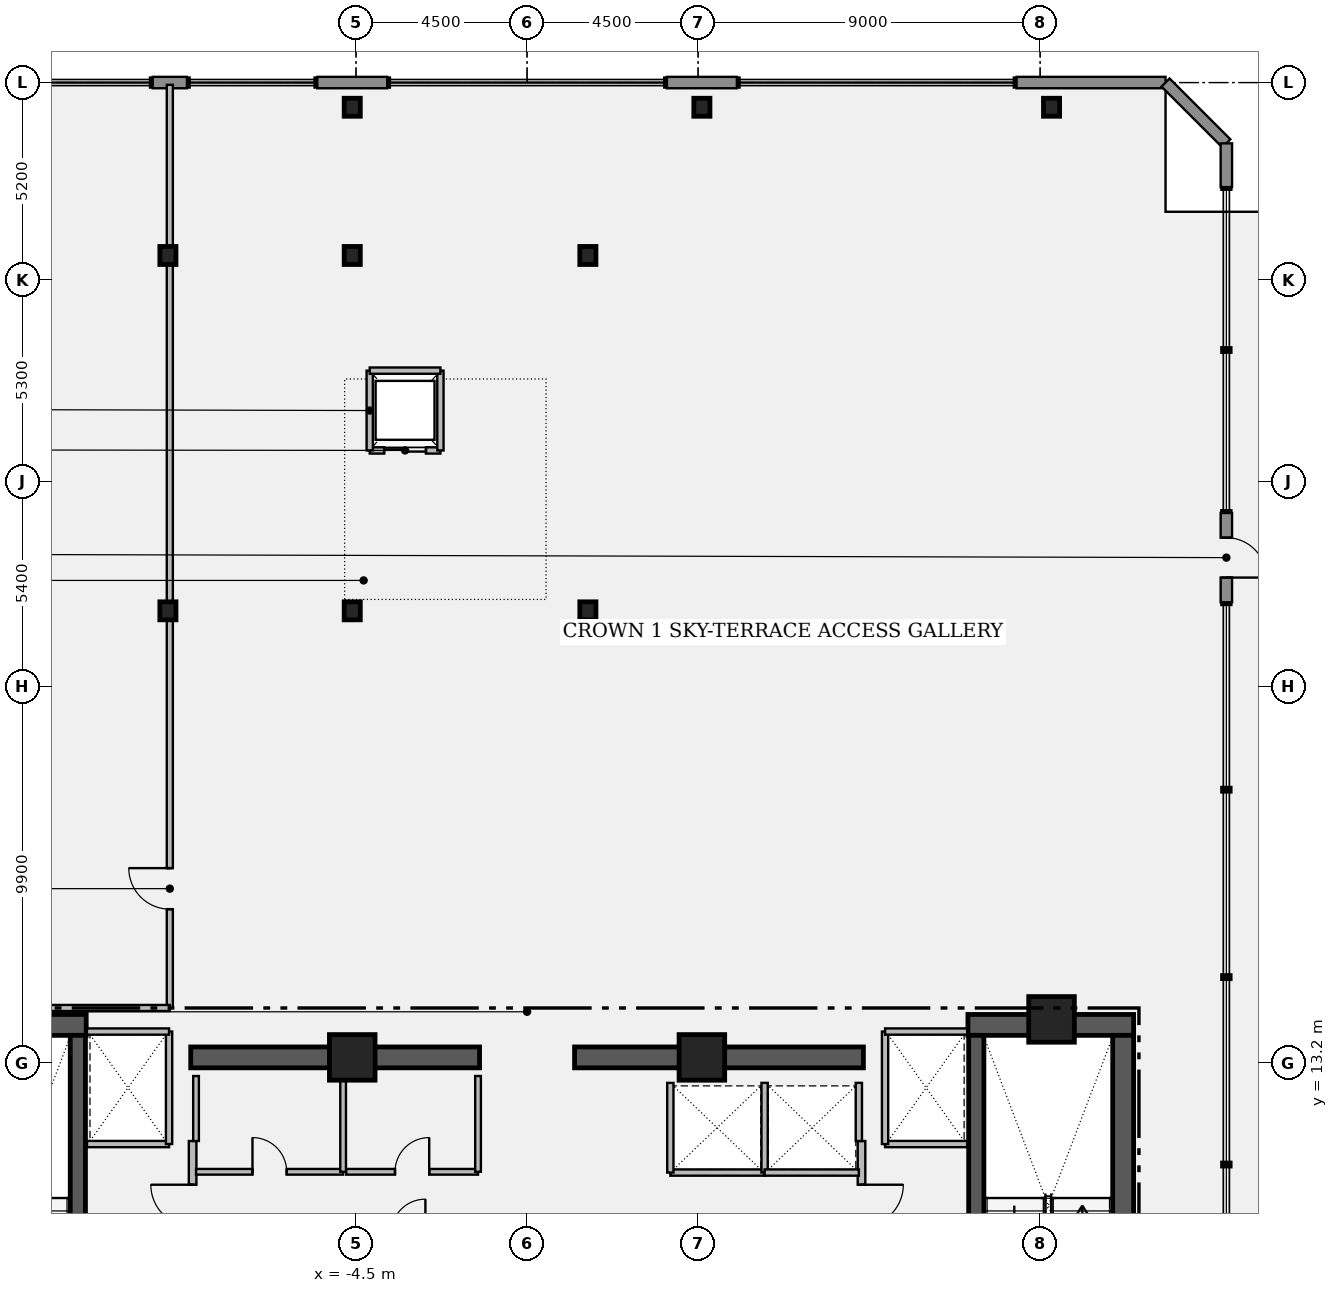
"""IFC4 building model, lengths in metres.
Left out: names, types, materials, properties, quantities, classifications, styles, units other than length and angle.
Written with IfcOpenShell. Run it as: python <this file> out.ifc"""

import sys

from ifc_helpers import new_model, si_unit, direction, frame, frame_2d, origin, origin_2d, place, context, subcontext, project, spatial, rectangle, i_section, extrude, element, fill, save


model = new_model("IFC4")
c1 = context("Model", 3, precision=1e-05, world=origin(), true_north=direction((0.0, 1.0)))
c2 = subcontext(c1, "Body", "Model", "MODEL_VIEW")
j1 = project(units=[si_unit("LENGTHUNIT", "METRE"), si_unit("PLANEANGLEUNIT", "RADIAN")], contexts=[c1])
p1 = place(None, origin())
s1 = spatial("IfcSite", under=j1, at=p1, CompositionType="ELEMENT")
p2 = place(p1, origin())
s2 = spatial("IfcBuilding", under=s1, at=p2, CompositionType="ELEMENT")
p3 = place(p2, frame((0.0, 0.0, 297.25)))
s3 = spatial("IfcBuildingStorey", under=s2, at=p3, CompositionType="ELEMENT", Elevation=297.25)
for number, where, z_axis, x_axis in (
    (1, (-15.96, 14.205, 0.0), (0.0, 0.0, 1.0), (1.0, 0.0, 0.0)),
    (2, (11.6, 14.205, 0.0), (0.0, 0.0, 1.0), (1.0, 0.0, 0.0)),
):
    element("IfcWall", number, at=place(p3, frame(where, z_axis=z_axis, x_axis=x_axis)), inside=s3, PredefinedType="SHEAR", context=c2, shape_type="SweptSolid", body=[
        extrude(rectangle(XDim=4.36, YDim=0.55, at=frame_2d((2.18, 0.0))), origin(), (0.0, 0.0, 1.0), 3.61),
    ])
p4 = place(p3, frame((15.685, 4.97, 0.0), z_axis=(0.0, 0.0, 1.0), x_axis=(0.0, 1.0, 0.0)))
e3 = element("IfcWall", 3, at=p4, inside=s3, PredefinedType="SHEAR", context=c2, shape_type="SweptSolid", body=[
    extrude(rectangle(XDim=8.96, YDim=0.55, at=frame_2d((4.48, 0.0))), origin(), (0.0, 0.0, 1.0), 3.61),
])
for number, where, z_axis, x_axis in (
    (4, (-8.85, 13.35, 0.0), (0.0, 0.0, 1.0), (1.0, 0.0, 0.0)),
    (5, (1.25, 13.35, 0.0), (0.0, 0.0, 1.0), (1.0, 0.0, 0.0)),
):
    element("IfcWall", number, at=place(p3, frame(where, z_axis=z_axis, x_axis=x_axis)), inside=s3, PredefinedType="SHEAR", context=c2, shape_type="SweptSolid", body=[
        extrude(rectangle(XDim=7.6, YDim=0.55, at=frame_2d((3.8, 0.0))), origin(), (0.0, 0.0, 1.0), 3.56),
    ])
p5 = place(p3, frame((-11.82, 4.97, 0.0), z_axis=(0.0, 0.0, 1.0), x_axis=(0.0, 1.0, 0.0)))
e6 = element("IfcWall", 6, at=p5, inside=s3, PredefinedType="SHEAR", context=c2, shape_type="SweptSolid", body=[
    extrude(rectangle(XDim=8.96, YDim=0.4, at=frame_2d((4.48, 0.0))), origin(), (0.0, 0.0, 1.0), 3.61),
])
p6 = place(p5, frame((0.31, 0.0, 0.0)))
e7 = element("IfcOpeningElement", 7, at=p6, cuts=e6, PredefinedType="OPENING", context=c2, shape_type="SweptSolid", body=[
    extrude(rectangle(XDim=1.12, YDim=2.22, at=frame_2d((0.56, 1.11))), frame((0.0, 0.21, 0.0), z_axis=(0.0, -1.0, 0.0), x_axis=(1.0, 0.0, 0.0)), (0.0, 0.0, 1.0), 0.42),
])
p7 = place(p3, frame((11.82, 13.93, 0.0), z_axis=(0.0, 0.0, 1.0), x_axis=(0.0, -1.0, 0.0)))
e8 = element("IfcWall", 8, at=p7, inside=s3, PredefinedType="SHEAR", context=c2, shape_type="SweptSolid", body=[
    extrude(rectangle(XDim=8.96, YDim=0.4, at=frame_2d((4.48, 0.0))), origin(), (0.0, 0.0, 1.0), 3.61),
])
p8 = place(p7, frame((7.53, 0.0, 0.0)))
e9 = element("IfcOpeningElement", 9, at=p8, cuts=e8, PredefinedType="OPENING", context=c2, shape_type="SweptSolid", body=[
    extrude(rectangle(XDim=1.12, YDim=2.22, at=frame_2d((0.56, 1.11))), frame((0.0, 0.21, 0.0), z_axis=(0.0, -1.0, 0.0), x_axis=(1.0, 0.0, 0.0)), (0.0, 0.0, 1.0), 0.42),
])
for number, where, z_axis, x_axis in (
    (10, (-4.6, 13.35, 0.0), (0.0, 0.0, 1.0), (1.0, 0.0, 0.0)),
    (11, (4.6, 13.35, 0.0), (0.0, 0.0, 1.0), (1.0, 0.0, 0.0)),
    (12, (13.8, 14.35, 0.0), (0.0, 0.0, 1.0), (1.0, 0.0, 0.0)),
):
    element("IfcColumn", number, at=place(p3, frame(where, z_axis=z_axis, x_axis=x_axis)), inside=s3, PredefinedType="COLUMN", context=c2, shape_type="SweptSolid", body=[
        extrude(rectangle(XDim=1.2, YDim=1.2, at=origin_2d()), origin(), (0.0, 0.0, 1.0), 3.8),
    ])
for number, where, z_axis, x_axis in (
    (13, (-9.45, 25.1, -0.24), (0.0, 0.0, 1.0), (1.0, 0.0, 0.0)),
    (14, (-4.6, 25.1, -0.24), (0.0, 0.0, 1.0), (1.0, 0.0, 0.0)),
    (15, (1.6, 25.1, -0.24), (0.0, 0.0, 1.0), (1.0, 0.0, 0.0)),
):
    element("IfcColumn", number, at=place(p3, frame(where, z_axis=z_axis, x_axis=x_axis)), inside=s3, PredefinedType="COLUMN", context=c2, shape_type="SweptSolid", body=[
        extrude(i_section(OverallWidth=0.424, OverallDepth=0.474, WebThickness=0.048, FlangeThickness=0.077, at=origin_2d()), origin(), (0.0, 0.0, 1.0), 4.04),
    ])
for number, where, z_axis, x_axis in (
    (16, (-9.45, 34.45, 0.0), (0.0, 0.0, 1.0), (1.0, 0.0, 0.0)),
    (17, (-4.6, 34.45, 0.0), (0.0, 0.0, 1.0), (1.0, 0.0, 0.0)),
    (18, (1.6, 34.45, 0.0), (0.0, 0.0, 1.0), (1.0, 0.0, 0.0)),
    (19, (-4.6, 38.35, 0.0), (0.0, 0.0, 1.0), (1.0, 0.0, 0.0)),
    (20, (4.6, 38.35, 0.0), (0.0, 0.0, 1.0), (1.0, 0.0, 0.0)),
    (21, (13.8, 38.35, 0.0), (0.0, 0.0, 1.0), (1.0, 0.0, 0.0)),
):
    element("IfcColumn", number, at=place(p3, frame(where, z_axis=z_axis, x_axis=x_axis)), inside=s3, PredefinedType="COLUMN", context=c2, shape_type="SweptSolid", body=[
        extrude(i_section(OverallWidth=0.424, OverallDepth=0.474, WebThickness=0.048, FlangeThickness=0.077, at=origin_2d()), origin(), (0.0, 0.0, 1.0), 3.8),
    ])
p9 = place(p3, frame((-9.85, 39.0, 0.0), z_axis=(0.0, 0.0, 1.0), x_axis=(1.0, 0.0, 0.0)))
e22 = element("IfcWall", 22, at=p9, inside=s3, PredefinedType="STANDARD", context=c2, shape_type="SweptSolid", body=[
    extrude(rectangle(XDim=0.9, YDim=0.3, at=frame_2d((0.45, 0.0))), origin(), (0.0, 0.0, 1.0), 3.56),
])
for number, where, z_axis, x_axis in (
    (23, (-5.52, 39.0, 0.0), (0.0, 0.0, 1.0), (1.0, 0.0, 0.0)),
    (24, (3.68, 39.0, 0.0), (0.0, 0.0, 1.0), (1.0, 0.0, 0.0)),
):
    element("IfcWall", number, at=place(p3, frame(where, z_axis=z_axis, x_axis=x_axis)), inside=s3, PredefinedType="STANDARD", context=c2, shape_type="SweptSolid", body=[
        extrude(rectangle(XDim=1.84, YDim=0.3, at=frame_2d((0.92, 0.0))), origin(), (0.0, 0.0, 1.0), 3.56),
    ])
p10 = place(p3, frame((12.88, 39.0, 0.0), z_axis=(0.0, 0.0, 1.0), x_axis=(1.0, 0.0, 0.0)))
e25 = element("IfcWall", 25, at=p10, inside=s3, PredefinedType="STANDARD", context=c2, shape_type="SweptSolid", body=[
    extrude(rectangle(XDim=3.92, YDim=0.3, at=frame_2d((1.96, 0.0))), origin(), (0.0, 0.0, 1.0), 3.56),
])
p11 = place(p3, frame((16.8, 39.0, 0.0), z_axis=(0.0, 0.0, 1.0), x_axis=(0.707052830339, -0.707160727918, 0.0)))
e26 = element("IfcWall", 26, at=p11, inside=s3, PredefinedType="STANDARD", context=c2, shape_type="SweptSolid", body=[
    extrude(rectangle(XDim=2.263, YDim=0.3, at=frame_2d((1.131, 0.0))), origin(), (0.0, 0.0, 1.0), 3.56),
])
p12 = place(p3, frame((18.4, 37.4, 0.0), z_axis=(0.0, 0.0, 1.0), x_axis=(0.0, -1.0, 0.0)))
e27 = element("IfcWall", 27, at=p12, inside=s3, PredefinedType="STANDARD", context=c2, shape_type="SweptSolid", body=[
    extrude(rectangle(XDim=1.15, YDim=0.3, at=frame_2d((0.575, 0.0))), origin(), (0.0, 0.0, 1.0), 3.56),
])
p13 = place(p3, frame((18.4, 27.675, 0.0), z_axis=(0.0, 0.0, 1.0), x_axis=(0.0, -1.0, 0.0)))
e28 = element("IfcWall", 28, at=p13, inside=s3, PredefinedType="STANDARD", context=c2, shape_type="SweptSolid", body=[
    extrude(rectangle(XDim=2.35, YDim=0.3, at=frame_2d((1.175, 0.0))), origin(), (0.0, 0.0, 1.0), 3.56),
])
p14 = place(p13, frame((0.65, 0.0, 0.0)))
e29 = element("IfcOpeningElement", 29, at=p14, cuts=e28, PredefinedType="OPENING", context=c2, shape_type="SweptSolid", body=[
    extrude(rectangle(XDim=1.05, YDim=2.2, at=frame_2d((0.525, 1.1))), frame((0.0, 0.16, 0.0), z_axis=(0.0, -1.0, 0.0), x_axis=(1.0, 0.0, 0.0)), (0.0, 0.0, 1.0), 0.32),
])
p15 = place(p3, frame((-4.14, 29.32, 0.0), z_axis=(0.0, 0.0, 1.0), x_axis=(1.0, 0.0, 0.0)))
e30 = element("IfcWall", 30, at=p15, inside=s3, PredefinedType="PARTITIONING", context=c2, shape_type="SweptSolid", body=[
    extrude(rectangle(XDim=1.86, YDim=0.165, at=frame_2d((0.93, 0.0))), origin(), (0.0, 0.0, 1.0), 3.56),
])
p16 = place(p15, frame((0.38, 0.0, 0.0)))
e31 = element("IfcOpeningElement", 31, at=p16, cuts=e30, PredefinedType="OPENING", context=c2, shape_type="SweptSolid", body=[
    extrude(rectangle(XDim=1.1, YDim=2.25, at=frame_2d((0.55, 1.125))), frame((0.0, 0.093, 0.0), z_axis=(0.0, -1.0, 0.0), x_axis=(1.0, 0.0, 0.0)), (0.0, 0.0, 1.0), 0.185),
])
p17 = place(p3, frame((-8.8, 5.05, 0.0), z_axis=(0.0, 0.0, 1.0), x_axis=(0.0, 1.0, 0.0)))
e32 = element("IfcWall", 32, at=p17, inside=s3, PredefinedType="PARTITIONING", context=c2, shape_type="SweptSolid", body=[
    extrude(rectangle(XDim=6.1, YDim=0.2, at=frame_2d((3.05, 0.0))), origin(), (0.0, 0.0, 1.0), 3.56),
])
p18 = place(p17, frame((0.25, 0.0, 0.0)))
e33 = element("IfcOpeningElement", 33, at=p18, cuts=e32, PredefinedType="OPENING", context=c2, shape_type="SweptSolid", body=[
    extrude(rectangle(XDim=1.1, YDim=2.2, at=frame_2d((0.55, 1.1))), frame((0.0, 0.11, 0.0), z_axis=(0.0, -1.0, 0.0), x_axis=(1.0, 0.0, 0.0)), (0.0, 0.0, 1.0), 0.22),
])
p19 = place(p17, frame((3.85, 0.0, 0.0)))
e34 = element("IfcOpeningElement", 34, at=p19, cuts=e32, PredefinedType="OPENING", context=c2, shape_type="SweptSolid", body=[
    extrude(rectangle(XDim=1.1, YDim=2.2, at=frame_2d((0.55, 1.1))), frame((0.0, 0.11, 0.0), z_axis=(0.0, -1.0, 0.0), x_axis=(1.0, 0.0, 0.0)), (0.0, 0.0, 1.0), 0.22),
])
p20 = place(p3, frame((8.8, 11.15, 0.0), z_axis=(0.0, 0.0, 1.0), x_axis=(0.0, -1.0, 0.0)))
e35 = element("IfcWall", 35, at=p20, inside=s3, PredefinedType="PARTITIONING", context=c2, shape_type="SweptSolid", body=[
    extrude(rectangle(XDim=6.1, YDim=0.2, at=frame_2d((3.05, 0.0))), origin(), (0.0, 0.0, 1.0), 3.56),
])
p21 = place(p20, frame((1.15, 0.0, 0.0)))
e36 = element("IfcOpeningElement", 36, at=p21, cuts=e35, PredefinedType="OPENING", context=c2, shape_type="SweptSolid", body=[
    extrude(rectangle(XDim=1.1, YDim=2.2, at=frame_2d((0.55, 1.1))), frame((0.0, 0.11, 0.0), z_axis=(0.0, -1.0, 0.0), x_axis=(1.0, 0.0, 0.0)), (0.0, 0.0, 1.0), 0.22),
])
p22 = place(p20, frame((4.75, 0.0, 0.0)))
e37 = element("IfcOpeningElement", 37, at=p22, cuts=e35, PredefinedType="OPENING", context=c2, shape_type="SweptSolid", body=[
    extrude(rectangle(XDim=1.1, YDim=2.2, at=frame_2d((0.55, 1.1))), frame((0.0, 0.11, 0.0), z_axis=(0.0, -1.0, 0.0), x_axis=(1.0, 0.0, 0.0)), (0.0, 0.0, 1.0), 0.22),
])
p23 = place(p3, frame((-8.71, 10.34, 0.0), z_axis=(0.0, 0.0, 1.0), x_axis=(1.0, 0.0, 0.0)))
e38 = element("IfcWall", 38, at=p23, inside=s3, PredefinedType="PARTITIONING", context=c2, shape_type="SweptSolid", body=[
    extrude(rectangle(XDim=3.87, YDim=0.15, at=frame_2d((1.935, 0.0))), origin(), (0.0, 0.0, 1.0), 3.56),
])
p24 = place(p23, frame((1.485, 0.0, 0.0)))
e39 = element("IfcOpeningElement", 39, at=p24, cuts=e38, PredefinedType="OPENING", context=c2, shape_type="SweptSolid", body=[
    extrude(rectangle(XDim=0.9, YDim=2.15, at=frame_2d((0.45, 1.075))), frame((0.0, 0.085, 0.0), z_axis=(0.0, -1.0, 0.0), x_axis=(1.0, 0.0, 0.0)), (0.0, 0.0, 1.0), 0.17),
])
p25 = place(p3, frame((-4.76, 10.34, 0.0), z_axis=(0.0, 0.0, 1.0), x_axis=(1.0, 0.0, 0.0)))
e40 = element("IfcWall", 40, at=p25, inside=s3, PredefinedType="PARTITIONING", context=c2, shape_type="SweptSolid", body=[
    extrude(rectangle(XDim=3.47, YDim=0.15, at=frame_2d((1.735, 0.0))), origin(), (0.0, 0.0, 1.0), 3.56),
])
p26 = place(p25, frame((1.285, 0.0, 0.0)))
e41 = element("IfcOpeningElement", 41, at=p26, cuts=e40, PredefinedType="OPENING", context=c2, shape_type="SweptSolid", body=[
    extrude(rectangle(XDim=0.9, YDim=2.15, at=frame_2d((0.45, 1.075))), frame((0.0, 0.085, 0.0), z_axis=(0.0, -1.0, 0.0), x_axis=(1.0, 0.0, 0.0)), (0.0, 0.0, 1.0), 0.17),
])
p27 = place(p3, frame((-9.4, 14.65, 0.0), z_axis=(0.0, 0.0, 1.0), x_axis=(0.0, 1.0, 0.0)))
e42 = element("IfcWall", 42, at=p27, inside=s3, PredefinedType="PARTITIONING", context=c2, shape_type="SweptSolid", body=[
    extrude(rectangle(XDim=24.29, YDim=0.16, at=frame_2d((12.145, 0.0))), origin(), (0.0, 0.0, 1.0), 2.442),
])
p28 = place(p27, frame((2.6, 0.0, 0.0)))
e43 = element("IfcOpeningElement", 43, at=p28, cuts=e42, PredefinedType="OPENING", context=c2, shape_type="SweptSolid", body=[
    extrude(rectangle(XDim=1.08, YDim=2.18, at=frame_2d((0.54, 1.09))), frame((0.0, 0.09, 0.0), z_axis=(0.0, -1.0, 0.0), x_axis=(1.0, 0.0, 0.0)), (0.0, 0.0, 1.0), 0.18),
])
for number, where, z_axis, x_axis in (
    (44, (-4.14, 29.32, 0.0), (0.0, 0.0, 1.0), (0.0, 1.0, 0.0)),
    (45, (-2.28, 29.32, 0.0), (0.0, 0.0, 1.0), (0.0, 1.0, 0.0)),
):
    element("IfcWall", number, at=place(p3, frame(where, z_axis=z_axis, x_axis=x_axis)), inside=s3, PredefinedType="PARTITIONING", context=c2, shape_type="SweptSolid", body=[
        extrude(rectangle(XDim=2.1, YDim=0.165, at=frame_2d((1.05, 0.0))), origin(), (0.0, 0.0, 1.0), 2.442),
    ])
p29 = place(p3, frame((-4.14, 31.42, 0.0), z_axis=(0.0, 0.0, 1.0), x_axis=(1.0, 0.0, 0.0)))
e46 = element("IfcWall", 46, at=p29, inside=s3, PredefinedType="PARTITIONING", context=c2, shape_type="SweptSolid", body=[
    extrude(rectangle(XDim=1.86, YDim=0.165, at=frame_2d((0.93, 0.0))), origin(), (0.0, 0.0, 1.0), 3.56),
])
p30 = place(p3, frame((-11.58, 11.07, 0.0), z_axis=(0.0, 0.0, 1.0), x_axis=(1.0, 0.0, 0.0)))
e47 = element("IfcWall", 47, at=p30, inside=s3, PredefinedType="PARTITIONING", context=c2, shape_type="SweptSolid", body=[
    extrude(rectangle(XDim=2.16, YDim=0.165, at=frame_2d((1.08, 0.0))), origin(), (0.0, 0.0, 1.0), 3.56),
])
p31 = place(p3, frame((-9.42, 11.07, 0.0), z_axis=(0.0, 0.0, 1.0), x_axis=(0.0, 1.0, 0.0)))
e48 = element("IfcWall", 48, at=p31, inside=s3, PredefinedType="PARTITIONING", context=c2, shape_type="SweptSolid", body=[
    extrude(rectangle(XDim=2.96, YDim=0.165, at=frame_2d((1.48, 0.0))), origin(), (0.0, 0.0, 1.0), 3.56),
])
for number, where, z_axis, x_axis in (
    (49, (-11.58, 14.03, 0.0), (0.0, 0.0, 1.0), (1.0, 0.0, 0.0)),
    (50, (9.42, 11.07, 0.0), (0.0, 0.0, 1.0), (1.0, 0.0, 0.0)),
):
    element("IfcWall", number, at=place(p3, frame(where, z_axis=z_axis, x_axis=x_axis)), inside=s3, PredefinedType="PARTITIONING", context=c2, shape_type="SweptSolid", body=[
        extrude(rectangle(XDim=2.16, YDim=0.165, at=frame_2d((1.08, 0.0))), origin(), (0.0, 0.0, 1.0), 3.56),
    ])
p32 = place(p3, frame((9.42, 11.07, 0.0), z_axis=(0.0, 0.0, 1.0), x_axis=(0.0, 1.0, 0.0)))
e51 = element("IfcWall", 51, at=p32, inside=s3, PredefinedType="PARTITIONING", context=c2, shape_type="SweptSolid", body=[
    extrude(rectangle(XDim=2.96, YDim=0.165, at=frame_2d((1.48, 0.0))), origin(), (0.0, 0.0, 1.0), 3.56),
])
p33 = place(p3, frame((9.42, 14.03, 0.0), z_axis=(0.0, 0.0, 1.0), x_axis=(1.0, 0.0, 0.0)))
e52 = element("IfcWall", 52, at=p33, inside=s3, PredefinedType="PARTITIONING", context=c2, shape_type="SweptSolid", body=[
    extrude(rectangle(XDim=2.16, YDim=0.165, at=frame_2d((1.08, 0.0))), origin(), (0.0, 0.0, 1.0), 3.56),
])
p34 = place(p3, frame((3.77, 10.32, 0.0), z_axis=(0.0, 0.0, 1.0), x_axis=(1.0, 0.0, 0.0)))
e53 = element("IfcWall", 53, at=p34, inside=s3, PredefinedType="PARTITIONING", context=c2, shape_type="SweptSolid", body=[
    extrude(rectangle(XDim=2.48, YDim=0.165, at=frame_2d((1.24, 0.0))), origin(), (0.0, 0.0, 1.0), 3.56),
])
for number, where, z_axis, x_axis in (
    (54, (3.77, 10.32, 0.0), (0.0, 0.0, 1.0), (0.0, 1.0, 0.0)),
    (55, (6.25, 10.32, 0.0), (0.0, 0.0, 1.0), (0.0, 1.0, 0.0)),
):
    element("IfcWall", number, at=place(p3, frame(where, z_axis=z_axis, x_axis=x_axis)), inside=s3, PredefinedType="PARTITIONING", context=c2, shape_type="SweptSolid", body=[
        extrude(rectangle(XDim=2.36, YDim=0.165, at=frame_2d((1.18, 0.0))), origin(), (0.0, 0.0, 1.0), 3.56),
    ])
p35 = place(p3, frame((6.25, 10.32, 0.0), z_axis=(0.0, 0.0, 1.0), x_axis=(1.0, 0.0, 0.0)))
e56 = element("IfcWall", 56, at=p35, inside=s3, PredefinedType="PARTITIONING", context=c2, shape_type="SweptSolid", body=[
    extrude(rectangle(XDim=2.48, YDim=0.165, at=frame_2d((1.24, 0.0))), origin(), (0.0, 0.0, 1.0), 3.56),
])
p36 = place(p3, frame((8.73, 11.15, 0.0), z_axis=(0.0, 0.0, 1.0), x_axis=(0.0, 1.0, 0.0)))
e57 = element("IfcWall", 57, at=p36, inside=s3, PredefinedType="PARTITIONING", context=c2, shape_type="SweptSolid", body=[
    extrude(rectangle(XDim=1.53, YDim=0.165, at=frame_2d((0.765, 0.0))), origin(), (0.0, 0.0, 1.0), 3.56),
])
p37 = place(p3, frame((-8.71, 11.15, 0.0), z_axis=(0.0, 0.0, 1.0), x_axis=(0.0, 1.0, 0.0)))
e58 = element("IfcWall", 58, at=p37, inside=s3, PredefinedType="PARTITIONING", context=c2, shape_type="SweptSolid", body=[
    extrude(rectangle(XDim=1.71, YDim=0.15, at=frame_2d((0.855, 0.0))), origin(), (0.0, 0.0, 1.0), 3.56),
])
for number, where, z_axis, x_axis in (
    (59, (-4.84, 10.34, 0.0), (0.0, 0.0, 1.0), (0.0, 1.0, 0.0)),
    (60, (-1.29, 10.34, 0.0), (0.0, 0.0, 1.0), (0.0, 1.0, 0.0)),
):
    element("IfcWall", number, at=place(p3, frame(where, z_axis=z_axis, x_axis=x_axis)), inside=s3, PredefinedType="PARTITIONING", context=c2, shape_type="SweptSolid", body=[
        extrude(rectangle(XDim=2.52, YDim=0.15, at=frame_2d((1.26, 0.0))), origin(), (0.0, 0.0, 1.0), 3.56),
    ])
p38 = place(p3, frame((-19.74, 14.65, 0.0), z_axis=(0.0, 0.0, 1.0), x_axis=(1.0, 0.0, 0.0)))
e61 = element("IfcWall", 61, at=p38, inside=s3, PredefinedType="PARTITIONING", context=c2, shape_type="SweptSolid", body=[
    extrude(rectangle(XDim=10.34, YDim=0.16, at=frame_2d((5.17, 0.0))), origin(), (0.0, 0.0, 1.0), 3.56),
])
p39 = place(p14, origin())
e62 = element("IfcDoor", 62, at=p39, inside=s3, OperationType="SINGLE_SWING_RIGHT", PredefinedType="DOOR", context=c2, shape_type="SweptSolid", body=[
    extrude(rectangle(XDim=1.05, YDim=2.2, at=frame_2d((0.525, 1.1))), frame((0.0, 0.025, 0.0), z_axis=(0.0, -1.0, 0.0), x_axis=(1.0, 0.0, 0.0)), (0.0, 0.0, 1.0), 0.05),
])
fill(e29, e62)
p40 = place(p16, origin())
e63 = element("IfcDoor", 63, at=p40, inside=s3, OperationType="SLIDING_TO_LEFT", PredefinedType="DOOR", context=c2, shape_type="SweptSolid", body=[
    extrude(rectangle(XDim=1.1, YDim=2.25, at=frame_2d((0.55, 1.125))), frame((0.0, 0.025, 0.0), z_axis=(0.0, -1.0, 0.0), x_axis=(1.0, 0.0, 0.0)), (0.0, 0.0, 1.0), 0.05),
])
fill(e31, e63)
p41 = place(p19, origin())
e64 = element("IfcDoor", 64, at=p41, inside=s3, OperationType="SINGLE_SWING_RIGHT", PredefinedType="DOOR", context=c2, shape_type="SweptSolid", body=[
    extrude(rectangle(XDim=1.1, YDim=2.2, at=frame_2d((0.55, 1.1))), frame((0.0, 0.025, 0.0), z_axis=(0.0, -1.0, 0.0), x_axis=(1.0, 0.0, 0.0)), (0.0, 0.0, 1.0), 0.05),
])
fill(e34, e64)
p42 = place(p21, origin())
e65 = element("IfcDoor", 65, at=p42, inside=s3, OperationType="SINGLE_SWING_LEFT", PredefinedType="DOOR", context=c2, shape_type="SweptSolid", body=[
    extrude(rectangle(XDim=1.1, YDim=2.2, at=frame_2d((0.55, 1.1))), frame((0.0, 0.025, 0.0), z_axis=(0.0, -1.0, 0.0), x_axis=(1.0, 0.0, 0.0)), (0.0, 0.0, 1.0), 0.05),
])
fill(e36, e65)
p43 = place(p24, origin())
e66 = element("IfcDoor", 66, at=p43, inside=s3, OperationType="SINGLE_SWING_LEFT", PredefinedType="DOOR", context=c2, shape_type="SweptSolid", body=[
    extrude(rectangle(XDim=0.9, YDim=2.15, at=frame_2d((0.45, 1.075))), frame((0.0, 0.025, 0.0), z_axis=(0.0, -1.0, 0.0), x_axis=(1.0, 0.0, 0.0)), (0.0, 0.0, 1.0), 0.05),
])
fill(e39, e66)
p44 = place(p26, origin())
e67 = element("IfcDoor", 67, at=p44, inside=s3, OperationType="SINGLE_SWING_RIGHT", PredefinedType="DOOR", context=c2, shape_type="SweptSolid", body=[
    extrude(rectangle(XDim=0.9, YDim=2.15, at=frame_2d((0.45, 1.075))), frame((0.0, 0.025, 0.0), z_axis=(0.0, -1.0, 0.0), x_axis=(1.0, 0.0, 0.0)), (0.0, 0.0, 1.0), 0.05),
])
fill(e41, e67)
p45 = place(p28, origin())
e68 = element("IfcDoor", 68, at=p45, inside=s3, OperationType="SINGLE_SWING_RIGHT", PredefinedType="DOOR", context=c2, shape_type="SweptSolid", body=[
    extrude(rectangle(XDim=1.08, YDim=2.18, at=frame_2d((0.54, 1.09))), frame((0.0, 0.025, 0.0), z_axis=(0.0, -1.0, 0.0), x_axis=(1.0, 0.0, 0.0)), (0.0, 0.0, 1.0), 0.05),
])
fill(e43, e68)
save(model, sys.argv[1])
